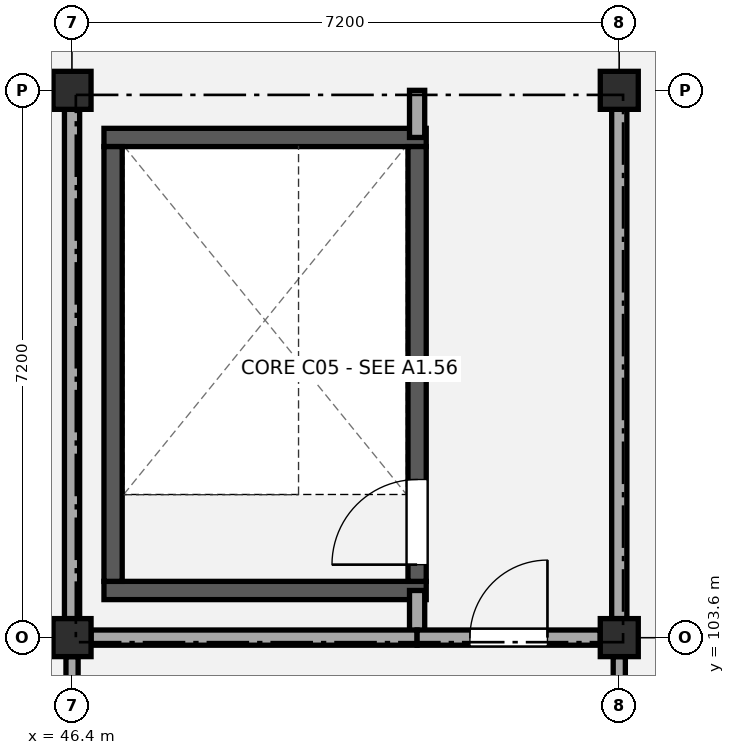
"""IFC4 building model, lengths in metres.
Left out: names, types, materials, properties, quantities, classifications, styles, units other than length and angle.
Written with IfcOpenShell. Run it as: python <this file> out.ifc"""

import sys

from ifc_helpers import new_model, si_unit, direction, frame, frame_2d, origin, origin_2d, place, context, subcontext, project, spatial, rectangle, extrude, element, fill, save


model = new_model("IFC4")
c1 = context("Model", 3, precision=1e-05, world=origin(), true_north=direction((0.0, 1.0)))
c2 = subcontext(c1, "Body", "Model", "MODEL_VIEW")
j1 = project(units=[si_unit("LENGTHUNIT", "METRE"), si_unit("PLANEANGLEUNIT", "RADIAN")], contexts=[c1])
p1 = place(None, origin())
s1 = spatial("IfcSite", under=j1, at=p1, CompositionType="ELEMENT")
p2 = place(p1, origin())
s2 = spatial("IfcBuilding", under=s1, at=p2, CompositionType="ELEMENT")
p3 = place(p2, frame((0.0, 0.0, 17.64)))
s3 = spatial("IfcBuildingStorey", under=s2, at=p3, CompositionType="ELEMENT", Elevation=17.64)
for number, where, z_axis, x_axis in (
    (1, (46.4, 103.6, 0.0), (0.0, 0.0, 1.0), (1.0, 0.0, 0.0)),
    (2, (46.4, 110.8, 0.0), (0.0, 0.0, 1.0), (1.0, 0.0, 0.0)),
    (3, (53.6, 103.6, 0.0), (0.0, 0.0, 1.0), (1.0, 0.0, 0.0)),
    (4, (53.6, 110.8, 0.0), (0.0, 0.0, 1.0), (1.0, 0.0, 0.0)),
):
    element("IfcColumn", number, at=place(p3, frame(where, z_axis=z_axis, x_axis=x_axis)), inside=s3, PredefinedType="COLUMN", context=c2, shape_type="SweptSolid", body=[
        extrude(rectangle(XDim=0.5, YDim=0.5, at=origin_2d()), origin(), (0.0, 0.0, 1.0), 3.96),
    ])
for number, where, z_axis, x_axis in (
    (5, (46.82, 104.22, 0.0), (0.0, 0.0, 1.0), (1.0, 0.0, 0.0)),
    (6, (46.82, 110.18, 0.0), (0.0, 0.0, 1.0), (1.0, 0.0, 0.0)),
):
    element("IfcWall", number, at=place(p3, frame(where, z_axis=z_axis, x_axis=x_axis)), inside=s3, PredefinedType="SHEAR", context=c2, shape_type="SweptSolid", body=[
        extrude(rectangle(XDim=4.24, YDim=0.24, at=frame_2d((2.12, 0.0))), origin(), (0.0, 0.0, 1.0), 3.64),
    ])
p4 = place(p3, frame((46.94, 104.34, 0.0), z_axis=(0.0, 0.0, 1.0), x_axis=(0.0, 1.0, 0.0)))
e7 = element("IfcWall", 7, at=p4, inside=s3, PredefinedType="SHEAR", context=c2, shape_type="SweptSolid", body=[
    extrude(rectangle(XDim=5.72, YDim=0.24, at=frame_2d((2.86, 0.0))), origin(), (0.0, 0.0, 1.0), 3.64),
])
p5 = place(p3, frame((50.94, 104.34, 0.0), z_axis=(0.0, 0.0, 1.0), x_axis=(0.0, 1.0, 0.0)))
e8 = element("IfcWall", 8, at=p5, inside=s3, PredefinedType="SHEAR", context=c2, shape_type="SweptSolid", body=[
    extrude(rectangle(XDim=5.72, YDim=0.24, at=frame_2d((2.86, 0.0))), origin(), (0.0, 0.0, 1.0), 3.64),
])
p6 = place(p5, frame((0.22, 0.0, 0.0)))
e9 = element("IfcOpeningElement", 9, at=p6, cuts=e8, PredefinedType="OPENING", context=c2, shape_type="SweptSolid", body=[
    extrude(rectangle(XDim=1.12, YDim=2.15, at=frame_2d((0.56, 1.075))), frame((0.0, 0.13, 0.0), z_axis=(0.0, -1.0, 0.0), x_axis=(1.0, 0.0, 0.0)), (0.0, 0.0, 1.0), 0.26),
])
p7 = place(p3, frame((50.94, 103.6, 0.0), z_axis=(0.0, 0.0, 1.0), x_axis=(0.0, 1.0, 0.0)))
e10 = element("IfcWall", 10, at=p7, inside=s3, PredefinedType="PARTITIONING", context=c2, shape_type="SweptSolid", body=[
    extrude(rectangle(XDim=0.62, YDim=0.2, at=frame_2d((0.31, 0.0))), origin(), (0.0, 0.0, 1.0), 2.98),
])
p8 = place(p3, frame((50.94, 110.18, 0.0), z_axis=(0.0, 0.0, 1.0), x_axis=(0.0, 1.0, 0.0)))
e11 = element("IfcWall", 11, at=p8, inside=s3, PredefinedType="PARTITIONING", context=c2, shape_type="SweptSolid", body=[
    extrude(rectangle(XDim=0.62, YDim=0.2, at=frame_2d((0.31, 0.0))), origin(), (0.0, 0.0, 1.0), 3.08),
])
for number, where, z_axis, x_axis in (
    (12, (46.4, 103.85, 0.0), (0.0, 0.0, 1.0), (0.0, 1.0, 0.0)),
    (13, (53.6, 103.85, 0.0), (0.0, 0.0, 1.0), (0.0, 1.0, 0.0)),
):
    element("IfcWall", number, at=place(p3, frame(where, z_axis=z_axis, x_axis=x_axis)), inside=s3, PredefinedType="PARTITIONING", context=c2, shape_type="SweptSolid", body=[
        extrude(rectangle(XDim=6.7, YDim=0.2, at=frame_2d((3.35, 0.0))), origin(), (0.0, 0.0, 1.0), 2.98),
    ])
p9 = place(p3, frame((46.65, 103.6, 0.0), z_axis=(0.0, 0.0, 1.0), x_axis=(1.0, 0.0, 0.0)))
e14 = element("IfcWall", 14, at=p9, inside=s3, PredefinedType="PARTITIONING", context=c2, shape_type="SweptSolid", body=[
    extrude(rectangle(XDim=4.29, YDim=0.2, at=frame_2d((2.145, 0.0))), origin(), (0.0, 0.0, 1.0), 2.98),
])
p10 = place(p3, frame((50.94, 103.6, 0.0), z_axis=(0.0, 0.0, 1.0), x_axis=(1.0, 0.0, 0.0)))
e15 = element("IfcWall", 15, at=p10, inside=s3, PredefinedType="PARTITIONING", context=c2, shape_type="SweptSolid", body=[
    extrude(rectangle(XDim=2.41, YDim=0.2, at=frame_2d((1.205, 0.0))), origin(), (0.0, 0.0, 1.0), 2.98),
])
p11 = place(p10, frame((0.695, 0.0, 0.0)))
e16 = element("IfcOpeningElement", 16, at=p11, cuts=e15, PredefinedType="OPENING", context=c2, shape_type="SweptSolid", body=[
    extrude(rectangle(XDim=1.02, YDim=2.15, at=frame_2d((0.51, 1.075))), frame((0.0, 0.11, 0.0), z_axis=(0.0, -1.0, 0.0), x_axis=(1.0, 0.0, 0.0)), (0.0, 0.0, 1.0), 0.22),
])
p12 = place(p3, frame((46.4, 96.65, 0.0), z_axis=(0.0, 0.0, 1.0), x_axis=(0.0, 1.0, 0.0)))
e17 = element("IfcWall", 17, at=p12, inside=s3, PredefinedType="PARTITIONING", context=c2, shape_type="SweptSolid", body=[
    extrude(rectangle(XDim=6.7, YDim=0.16, at=frame_2d((3.35, 0.0))), origin(), (0.0, 0.0, 1.0), 3.03),
])
p13 = place(p3, frame((53.6, 96.65, 0.0), z_axis=(0.0, 0.0, 1.0), x_axis=(0.0, 1.0, 0.0)))
e18 = element("IfcWall", 18, at=p13, inside=s3, PredefinedType="PARTITIONING", context=c2, shape_type="SweptSolid", body=[
    extrude(rectangle(XDim=6.7, YDim=0.16, at=frame_2d((3.35, 0.0))), origin(), (0.0, 0.0, 1.0), 3.03),
])
p14 = place(p13, frame((2.71, 0.0, 0.0)))
e19 = element("IfcOpeningElement", 19, at=p14, cuts=e18, PredefinedType="OPENING", context=c2, shape_type="SweptSolid", body=[
    extrude(rectangle(XDim=1.28, YDim=2.2, at=frame_2d((0.64, 1.1))), frame((0.0, 0.09, 0.0), z_axis=(0.0, -1.0, 0.0), x_axis=(1.0, 0.0, 0.0)), (0.0, 0.0, 1.0), 0.18),
])
p15 = place(p6, origin())
e20 = element("IfcDoor", 20, at=p15, inside=s3, OperationType="SINGLE_SWING_LEFT", PredefinedType="DOOR", context=c2, shape_type="SweptSolid", body=[
    extrude(rectangle(XDim=1.12, YDim=2.15, at=frame_2d((0.56, 1.075))), frame((0.0, 0.025, 0.0), z_axis=(0.0, -1.0, 0.0), x_axis=(1.0, 0.0, 0.0)), (0.0, 0.0, 1.0), 0.05),
])
fill(e9, e20)
p16 = place(p11, origin())
e21 = element("IfcDoor", 21, at=p16, inside=s3, OperationType="SINGLE_SWING_RIGHT", PredefinedType="DOOR", context=c2, shape_type="SweptSolid", body=[
    extrude(rectangle(XDim=1.02, YDim=2.15, at=frame_2d((0.51, 1.075))), frame((0.0, 0.025, 0.0), z_axis=(0.0, -1.0, 0.0), x_axis=(1.0, 0.0, 0.0)), (0.0, 0.0, 1.0), 0.05),
])
fill(e16, e21)
save(model, sys.argv[1])
